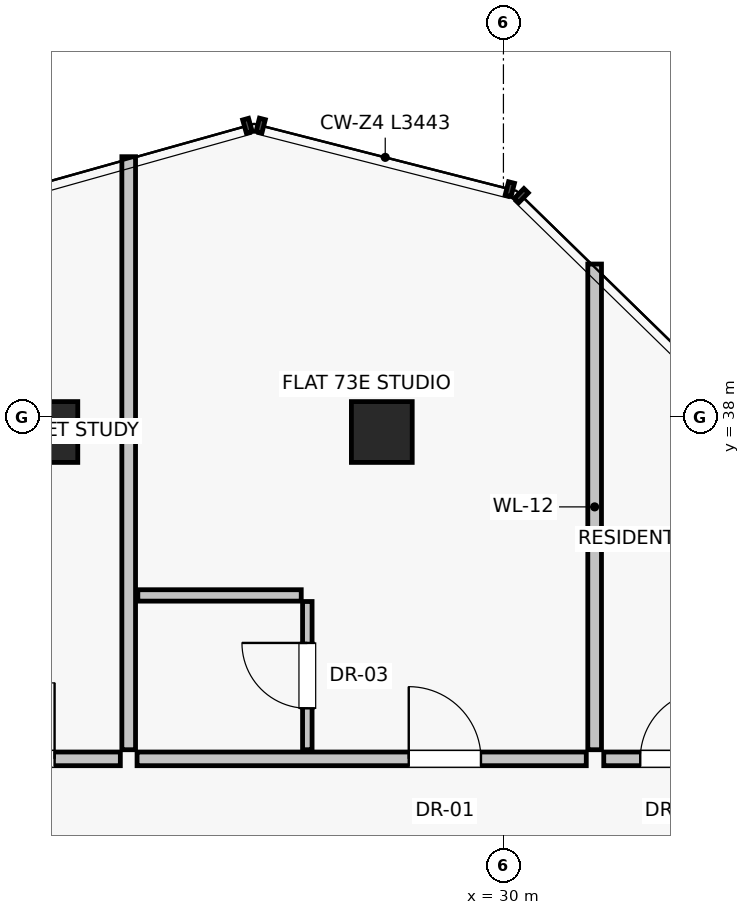
"""IFC4 building model, lengths in metres.
Left out: names, types, materials, properties, quantities, classifications, styles, units other than length and angle.
Written with IfcOpenShell. Run it as: python <this file> out.ifc"""

import sys

from ifc_helpers import new_model, si_unit, direction, frame, frame_2d, origin, origin_2d, place, context, subcontext, project, spatial, rectangle, extrude, source, transform, mapped, element, fill, save


model = new_model("IFC4")
c1 = context("Model", 3, precision=1e-05, world=origin(), true_north=direction((0.0, 1.0)))
c2 = subcontext(c1, "Body", "Model", "MODEL_VIEW")
j1 = project(units=[si_unit("LENGTHUNIT", "METRE"), si_unit("PLANEANGLEUNIT", "RADIAN")], contexts=[c1])
p1 = place(None, origin())
s1 = spatial("IfcSite", under=j1, at=p1, CompositionType="ELEMENT")
p2 = place(p1, origin())
s2 = spatial("IfcBuilding", under=s1, at=p2, CompositionType="ELEMENT")
p3 = place(p2, frame((0.0, 0.0, 257.75)))
s3 = spatial("IfcBuildingStorey", under=s2, at=p3, CompositionType="ELEMENT", Elevation=257.75)
for number, where, z_axis, x_axis in (
    (1, (28.4, 37.8, 0.0), (0.0, 0.0, 1.0), (1.0, 0.0, 0.0)),
    (2, (24.0, 37.8, 0.0), (0.0, 0.0, 1.0), (1.0, 0.0, 0.0)),
):
    element("IfcColumn", number, at=place(p3, frame(where, z_axis=z_axis, x_axis=x_axis)), inside=s3, PredefinedType="COLUMN", context=c2, shape_type="SweptSolid", body=[
        extrude(rectangle(XDim=0.8, YDim=0.8, at=origin_2d()), origin(), (0.0, 0.0, 1.0), 3.25),
    ])
p4 = place(p3, frame((31.2, 33.62, 0.0), z_axis=(0.0, 0.0, 1.0), x_axis=(0.0, 1.0, 0.0)))
e3 = element("IfcWall", 3, at=p4, inside=s3, PredefinedType="PARTITIONING", context=c2, shape_type="SweptSolid", body=[
    extrude(rectangle(XDim=6.39, YDim=0.18, at=frame_2d((3.195, 0.0))), origin(), (0.0, 0.0, 1.0), 3.015),
])
p5 = place(p3, frame((22.23, 33.5, 0.0), z_axis=(0.0, 0.0, 1.0), x_axis=(1.0, 0.0, 0.0)))
e4 = element("IfcWall", 4, at=p5, inside=s3, PredefinedType="PARTITIONING", context=c2, shape_type="SweptSolid", body=[
    extrude(rectangle(XDim=2.73, YDim=0.18, at=frame_2d((1.365, 0.0))), origin(), (0.0, 0.0, 1.0), 3.015),
])
p6 = place(p5, frame((0.865, 0.0, 0.0)))
e5 = element("IfcOpeningElement", 5, at=p6, cuts=e4, PredefinedType="OPENING", context=c2, shape_type="SweptSolid", body=[
    extrude(rectangle(XDim=1.0, YDim=2.01, at=frame_2d((0.5, 1.005))), frame((0.0, 0.1, 0.0), z_axis=(0.0, -1.0, 0.0), x_axis=(1.0, 0.0, 0.0)), (0.0, 0.0, 1.0), 0.2),
])
p7 = place(p3, frame((25.07, 33.62, 0.0), z_axis=(0.0, 0.0, 1.0), x_axis=(0.0, 1.0, 0.0)))
e6 = element("IfcWall", 6, at=p7, inside=s3, PredefinedType="PARTITIONING", context=c2, shape_type="SweptSolid", body=[
    extrude(rectangle(XDim=7.802, YDim=0.18, at=frame_2d((3.901, 0.0))), origin(), (0.0, 0.0, 1.0), 3.015),
])
p8 = place(p3, frame((25.18, 33.5, 0.0), z_axis=(0.0, 0.0, 1.0), x_axis=(1.0, 0.0, 0.0)))
e7 = element("IfcWall", 7, at=p8, inside=s3, PredefinedType="PARTITIONING", context=c2, shape_type="SweptSolid", body=[
    extrude(rectangle(XDim=5.91, YDim=0.18, at=frame_2d((2.955, 0.0))), origin(), (0.0, 0.0, 1.0), 3.015),
])
p9 = place(p8, frame((3.574, 0.0, 0.0)))
e8 = element("IfcOpeningElement", 8, at=p9, cuts=e7, PredefinedType="OPENING", context=c2, shape_type="SweptSolid", body=[
    extrude(rectangle(XDim=0.95, YDim=2.02, at=frame_2d((0.475, 1.01))), frame((0.0, 0.1, 0.0), z_axis=(0.0, -1.0, 0.0), x_axis=(1.0, 0.0, 0.0)), (0.0, 0.0, 1.0), 0.2),
])
p10 = place(p3, frame((27.42, 33.62, 0.0), z_axis=(0.0, 0.0, 1.0), x_axis=(0.0, 1.0, 0.0)))
e9 = element("IfcWall", 9, at=p10, inside=s3, PredefinedType="PARTITIONING", context=c2, shape_type="SweptSolid", body=[
    extrude(rectangle(XDim=1.95, YDim=0.125, at=frame_2d((0.975, 0.0))), origin(), (0.0, 0.0, 1.0), 3.015),
])
p11 = place(p10, frame((0.545, 0.0, 0.0)))
e10 = element("IfcOpeningElement", 10, at=p11, cuts=e9, PredefinedType="OPENING", context=c2, shape_type="SweptSolid", body=[
    extrude(rectangle(XDim=0.86, YDim=2.01, at=frame_2d((0.43, 1.005))), frame((0.0, 0.073, 0.0), z_axis=(0.0, -1.0, 0.0), x_axis=(1.0, 0.0, 0.0)), (0.0, 0.0, 1.0), 0.145),
])
p12 = place(p3, frame((25.19, 35.65, 0.0), z_axis=(0.0, 0.0, 1.0), x_axis=(1.0, 0.0, 0.0)))
e11 = element("IfcWall", 11, at=p12, inside=s3, PredefinedType="PARTITIONING", context=c2, shape_type="SweptSolid", body=[
    extrude(rectangle(XDim=2.15, YDim=0.15, at=frame_2d((1.075, 0.0))), origin(), (0.0, 0.0, 1.0), 3.015),
])
p13 = place(p3, frame((31.32, 33.5, 0.0), z_axis=(0.0, 0.0, 1.0), x_axis=(1.0, 0.0, 0.0)))
e12 = element("IfcWall", 12, at=p13, inside=s3, PredefinedType="PARTITIONING", context=c2, shape_type="SweptSolid", body=[
    extrude(rectangle(XDim=1.86, YDim=0.18, at=frame_2d((0.93, 0.0))), origin(), (0.0, 0.0, 1.0), 3.015),
])
p14 = place(p13, frame((0.48, 0.0, 0.0)))
e13 = element("IfcOpeningElement", 13, at=p14, cuts=e12, PredefinedType="OPENING", context=c2, shape_type="SweptSolid", body=[
    extrude(rectangle(XDim=0.9, YDim=2.01, at=frame_2d((0.45, 1.005))), frame((0.0, 0.1, 0.0), z_axis=(0.0, -1.0, 0.0), x_axis=(1.0, 0.0, 0.0)), (0.0, 0.0, 1.0), 0.2),
])
m1 = source(origin(), c2, "Body", "SweptSolid", [
    extrude(rectangle(XDim=1.0, YDim=2.01, at=frame_2d((0.5, 1.005))), frame((0.0, 0.025, 0.0), z_axis=(0.0, -1.0, 0.0), x_axis=(1.0, 0.0, 0.0)), (0.0, 0.0, 1.0), 0.05),
])
p15 = place(p6, origin())
e14 = element("IfcDoor", 14, at=p15, inside=s3, OperationType="SINGLE_SWING_RIGHT", PredefinedType="DOOR", context=c2, shape_type="MappedRepresentation", body=[
    mapped(m1, transform((0.0, 0.0, 0.0), scale=1.0)),
])
fill(e5, e14)
m2 = source(origin(), c2, "Body", "SweptSolid", [
    extrude(rectangle(XDim=0.95, YDim=2.02, at=frame_2d((0.475, 1.01))), frame((0.0, 0.025, 0.0), z_axis=(0.0, -1.0, 0.0), x_axis=(1.0, 0.0, 0.0)), (0.0, 0.0, 1.0), 0.05),
])
p16 = place(p9, origin())
e15 = element("IfcDoor", 15, at=p16, inside=s3, OperationType="SINGLE_SWING_LEFT", PredefinedType="DOOR", context=c2, shape_type="MappedRepresentation", body=[
    mapped(m2, transform((0.0, 0.0, 0.0), scale=1.0)),
])
fill(e8, e15)
m3 = source(origin(), c2, "Body", "SweptSolid", [
    extrude(rectangle(XDim=0.86, YDim=2.01, at=frame_2d((0.43, 1.005))), frame((0.0, 0.025, 0.0), z_axis=(0.0, -1.0, 0.0), x_axis=(1.0, 0.0, 0.0)), (0.0, 0.0, 1.0), 0.05),
])
p17 = place(p11, origin())
e16 = element("IfcDoor", 16, at=p17, inside=s3, OperationType="SINGLE_SWING_RIGHT", PredefinedType="DOOR", context=c2, shape_type="MappedRepresentation", body=[
    mapped(m3, transform((0.0, 0.0, 0.0), scale=1.0)),
])
fill(e10, e16)
m4 = source(origin(), c2, "Body", "SweptSolid", [
    extrude(rectangle(XDim=0.9, YDim=2.01, at=frame_2d((0.45, 1.005))), frame((0.0, 0.025, 0.0), z_axis=(0.0, -1.0, 0.0), x_axis=(1.0, 0.0, 0.0)), (0.0, 0.0, 1.0), 0.05),
])
p18 = place(p14, origin())
e17 = element("IfcDoor", 17, at=p18, inside=s3, OperationType="SINGLE_SWING_RIGHT", PredefinedType="DOOR", context=c2, shape_type="MappedRepresentation", body=[
    mapped(m4, transform((0.0, 0.0, 0.0), scale=1.0)),
])
fill(e13, e17)
save(model, sys.argv[1])
